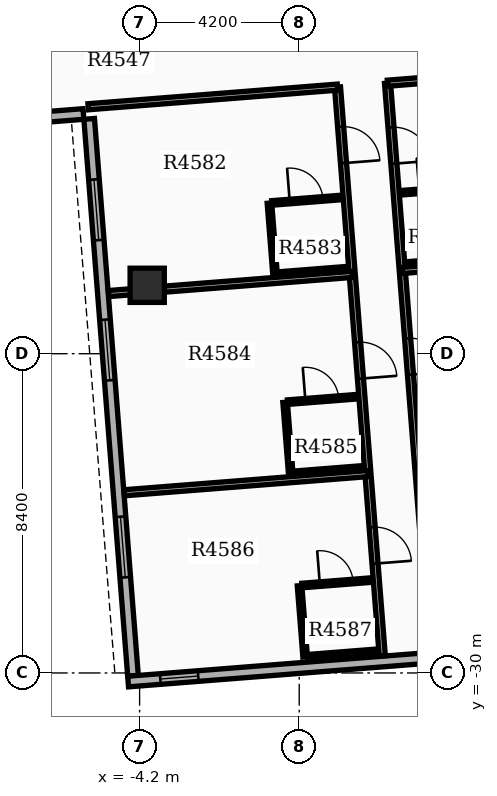
"""IFC4 building model, lengths in metres.
Left out: names, types, materials, properties, quantities, classifications, styles, units other than length and angle.
Written with IfcOpenShell. Run it as: python <this file> out.ifc"""

import sys

from ifc_helpers import new_model, si_unit, direction, frame, frame_2d, origin, origin_2d, place, context, subcontext, project, spatial, rectangle, circle, extrude, element, fill, save


model = new_model("IFC4")
c1 = context("Model", 3, precision=1e-05, world=origin(), true_north=direction((0.0, 1.0)))
c2 = subcontext(c1, "Body", "Model", "MODEL_VIEW")
j1 = project(units=[si_unit("LENGTHUNIT", "METRE"), si_unit("PLANEANGLEUNIT", "RADIAN")], contexts=[c1])
p1 = place(None, origin())
s1 = spatial("IfcSite", under=j1, at=p1, CompositionType="ELEMENT")
p2 = place(p1, origin())
s2 = spatial("IfcBuilding", under=s1, at=p2, CompositionType="ELEMENT")
p3 = place(p2, frame((0.0, 0.0, 285.0)))
s3 = spatial("IfcBuildingStorey", under=s2, at=p3, CompositionType="ELEMENT", Elevation=285.0)
p4 = place(p3, frame((-4.0, -19.8, 0.0), z_axis=(0.0, 0.0, 1.0), x_axis=(1.0, 0.0, 0.0)))
e1 = element("IfcColumn", 1, at=p4, inside=s3, PredefinedType="COLUMN", context=c2, shape_type="SweptSolid", body=[
    extrude(circle(Radius=0.45, at=origin_2d()), origin(), (0.0, 0.0, 1.0), 3.9),
])
p5 = place(p3, frame((-5.527, -15.421, 0.0), z_axis=(0.0, 0.0, 1.0), x_axis=(0.078456642068, -0.996917526837, 0.0)))
e2 = element("IfcWall", 2, at=p5, inside=s3, PredefinedType="STANDARD", context=c2, shape_type="SweptSolid", body=[
    extrude(rectangle(XDim=14.7, YDim=0.28, at=frame_2d((7.35, 0.0))), origin(), (0.0, 0.0, 1.0), 3.13),
])
p6 = place(p5, frame((1.6, 0.0, 0.8)))
e3 = element("IfcOpeningElement", 3, at=p6, cuts=e2, PredefinedType="OPENING", context=c2, shape_type="SweptSolid", body=[
    extrude(rectangle(XDim=1.6, YDim=1.7, at=frame_2d((0.8, 0.85))), frame((0.0, 0.15, 0.0), z_axis=(0.0, -1.0, 0.0), x_axis=(1.0, 0.0, 0.0)), (0.0, 0.0, 1.0), 0.3),
])
p7 = place(p5, frame((5.3, 0.0, 0.8)))
e4 = element("IfcOpeningElement", 4, at=p7, cuts=e2, PredefinedType="OPENING", context=c2, shape_type="SweptSolid", body=[
    extrude(rectangle(XDim=1.6, YDim=1.7, at=frame_2d((0.8, 0.85))), frame((0.0, 0.15, 0.0), z_axis=(0.0, -1.0, 0.0), x_axis=(1.0, 0.0, 0.0)), (0.0, 0.0, 1.0), 0.3),
])
p8 = place(p5, frame((10.5, 0.0, 0.8)))
e5 = element("IfcOpeningElement", 5, at=p8, cuts=e2, PredefinedType="OPENING", context=c2, shape_type="SweptSolid", body=[
    extrude(rectangle(XDim=1.6, YDim=1.7, at=frame_2d((0.8, 0.85))), frame((0.0, 0.15, 0.0), z_axis=(0.0, -1.0, 0.0), x_axis=(1.0, 0.0, 0.0)), (0.0, 0.0, 1.0), 0.3),
])
p9 = place(p3, frame((-4.502, -30.226, 0.0), z_axis=(0.0, 0.0, 1.0), x_axis=(0.996917480881, 0.078457226018, 0.0)))
e6 = element("IfcWall", 6, at=p9, inside=s3, PredefinedType="STANDARD", context=c2, shape_type="SweptSolid", body=[
    extrude(rectangle(XDim=13.72, YDim=0.28, at=frame_2d((6.86, 0.0))), origin(), (0.0, 0.0, 1.0), 3.13),
])
p10 = place(p9, frame((0.85, 0.0, 0.85)))
e7 = element("IfcOpeningElement", 7, at=p10, cuts=e6, PredefinedType="OPENING", context=c2, shape_type="SweptSolid", body=[
    extrude(rectangle(XDim=1.0, YDim=1.5, at=frame_2d((0.5, 0.75))), frame((0.0, 0.15, 0.0), z_axis=(0.0, -1.0, 0.0), x_axis=(1.0, 0.0, 0.0)), (0.0, 0.0, 1.0), 0.3),
])
p11 = place(p3, frame((-11.958, -15.787, 0.0), z_axis=(0.0, 0.0, 1.0), x_axis=(0.996916125428, 0.078474447191, 0.0)))
e8 = element("IfcWall", 8, at=p11, inside=s3, PredefinedType="STANDARD", context=c2, shape_type="SweptSolid", body=[
    extrude(rectangle(XDim=6.3, YDim=0.28, at=frame_2d((3.15, 0.0))), origin(), (0.0, 0.0, 1.0), 3.13),
])
p12 = place(p3, frame((2.323, -14.482, 0.0), z_axis=(0.0, 0.0, 1.0), x_axis=(0.078453666116, -0.996917761038, 0.0)))
e9 = element("IfcWall", 9, at=p12, inside=s3, PredefinedType="PARTITIONING", context=c2, shape_type="SweptSolid", body=[
    extrude(rectangle(XDim=15.012, YDim=0.16, at=frame_2d((7.506, 0.0))), origin(), (0.0, 0.0, 1.0), 3.12),
])
p13 = place(p12, frame((1.165, 0.0, 0.0)))
e10 = element("IfcOpeningElement", 10, at=p13, cuts=e9, PredefinedType="OPENING", context=c2, shape_type="SweptSolid", body=[
    extrude(rectangle(XDim=0.96, YDim=2.15, at=frame_2d((0.48, 1.075))), frame((0.0, 0.09, 0.0), z_axis=(0.0, -1.0, 0.0), x_axis=(1.0, 0.0, 0.0)), (0.0, 0.0, 1.0), 0.18),
])
p14 = place(p12, frame((6.734, 0.0, 0.0)))
e11 = element("IfcOpeningElement", 11, at=p14, cuts=e9, PredefinedType="OPENING", context=c2, shape_type="SweptSolid", body=[
    extrude(rectangle(XDim=0.96, YDim=2.15, at=frame_2d((0.48, 1.075))), frame((0.0, 0.09, 0.0), z_axis=(0.0, -1.0, 0.0), x_axis=(1.0, 0.0, 0.0)), (0.0, 0.0, 1.0), 0.18),
])
p15 = place(p12, frame((11.616, 0.0, 0.0)))
e12 = element("IfcOpeningElement", 12, at=p15, cuts=e9, PredefinedType="OPENING", context=c2, shape_type="SweptSolid", body=[
    extrude(rectangle(XDim=0.96, YDim=2.15, at=frame_2d((0.48, 1.075))), frame((0.0, 0.09, 0.0), z_axis=(0.0, -1.0, 0.0), x_axis=(1.0, 0.0, 0.0)), (0.0, 0.0, 1.0), 0.18),
])
p16 = place(p3, frame((2.323, -14.482, 0.0), z_axis=(0.0, 0.0, 1.0), x_axis=(0.996915230802, 0.078485811425, 0.0)))
e13 = element("IfcWall", 13, at=p16, inside=s3, PredefinedType="PARTITIONING", context=c2, shape_type="SweptSolid", body=[
    extrude(rectangle(XDim=5.54, YDim=0.16, at=frame_2d((2.77, 0.0))), origin(), (0.0, 0.0, 1.0), 3.12),
])
p17 = place(p3, frame((2.711, -19.409, 0.0), z_axis=(0.0, 0.0, 1.0), x_axis=(0.996916817298, 0.078465657388, 0.0)))
e14 = element("IfcWall", 14, at=p17, inside=s3, PredefinedType="PARTITIONING", context=c2, shape_type="SweptSolid", body=[
    extrude(rectangle(XDim=5.392, YDim=0.16, at=frame_2d((2.696, 0.0))), origin(), (0.0, 0.0, 1.0), 3.12),
])
p18 = place(p3, frame((2.691, -17.365, 0.0), z_axis=(0.0, 0.0, 1.0), x_axis=(0.996916400774, 0.0784709492, 0.0)))
e15 = element("IfcWall", 15, at=p18, inside=s3, PredefinedType="PARTITIONING", context=c2, shape_type="SweptSolid", body=[
    extrude(rectangle(XDim=1.82, YDim=0.12, at=frame_2d((0.91, 0.0))), origin(), (0.0, 0.0, 1.0), 3.12),
])
p19 = place(p18, frame((0.47, 0.0, 0.0)))
e16 = element("IfcOpeningElement", 16, at=p19, cuts=e15, PredefinedType="OPENING", context=c2, shape_type="SweptSolid", body=[
    extrude(rectangle(XDim=0.88, YDim=2.1, at=frame_2d((0.44, 1.05))), frame((0.0, 0.07, 0.0), z_axis=(0.0, -1.0, 0.0), x_axis=(1.0, 0.0, 0.0)), (0.0, 0.0, 1.0), 0.14),
])
p20 = place(p3, frame((2.838, -19.239, 0.0), z_axis=(0.0, 0.0, 1.0), x_axis=(0.996916400774, 0.0784709492, 0.0)))
e17 = element("IfcWall", 17, at=p20, inside=s3, PredefinedType="PARTITIONING", context=c2, shape_type="SweptSolid", body=[
    extrude(rectangle(XDim=1.82, YDim=0.12, at=frame_2d((0.91, 0.0))), origin(), (0.0, 0.0, 1.0), 3.12),
])
p21 = place(p3, frame((3.103, -22.606, 0.0), z_axis=(0.0, 0.0, 1.0), x_axis=(0.996915574626, 0.078481444107, 0.0)))
e18 = element("IfcWall", 18, at=p21, inside=s3, PredefinedType="PARTITIONING", context=c2, shape_type="SweptSolid", body=[
    extrude(rectangle(XDim=1.82, YDim=0.12, at=frame_2d((0.91, 0.0))), origin(), (0.0, 0.0, 1.0), 3.12),
])
p22 = place(p21, frame((0.47, 0.0, 0.0)))
e19 = element("IfcOpeningElement", 19, at=p22, cuts=e18, PredefinedType="OPENING", context=c2, shape_type="SweptSolid", body=[
    extrude(rectangle(XDim=0.88, YDim=2.1, at=frame_2d((0.44, 1.05))), frame((0.0, 0.07, 0.0), z_axis=(0.0, -1.0, 0.0), x_axis=(1.0, 0.0, 0.0)), (0.0, 0.0, 1.0), 0.14),
])
p23 = place(p3, frame((1.008, -14.586, 0.0), z_axis=(0.0, 0.0, 1.0), x_axis=(0.078453666116, -0.996917761038, 0.0)))
e20 = element("IfcWall", 20, at=p23, inside=s3, PredefinedType="PARTITIONING", context=c2, shape_type="SweptSolid", body=[
    extrude(rectangle(XDim=15.012, YDim=0.16, at=frame_2d((7.506, 0.0))), origin(), (0.0, 0.0, 1.0), 3.12),
])
p24 = place(p23, frame((1.046, 0.0, 0.0)))
e21 = element("IfcOpeningElement", 21, at=p24, cuts=e20, PredefinedType="OPENING", context=c2, shape_type="SweptSolid", body=[
    extrude(rectangle(XDim=0.96, YDim=2.15, at=frame_2d((0.48, 1.075))), frame((0.0, 0.09, 0.0), z_axis=(0.0, -1.0, 0.0), x_axis=(1.0, 0.0, 0.0)), (0.0, 0.0, 1.0), 0.18),
])
p25 = place(p23, frame((6.734, 0.0, 0.0)))
e22 = element("IfcOpeningElement", 22, at=p25, cuts=e20, PredefinedType="OPENING", context=c2, shape_type="SweptSolid", body=[
    extrude(rectangle(XDim=0.96, YDim=2.15, at=frame_2d((0.48, 1.075))), frame((0.0, 0.09, 0.0), z_axis=(0.0, -1.0, 0.0), x_axis=(1.0, 0.0, 0.0)), (0.0, 0.0, 1.0), 0.18),
])
p26 = place(p23, frame((11.616, 0.0, 0.0)))
e23 = element("IfcOpeningElement", 23, at=p26, cuts=e20, PredefinedType="OPENING", context=c2, shape_type="SweptSolid", body=[
    extrude(rectangle(XDim=0.96, YDim=2.15, at=frame_2d((0.48, 1.075))), frame((0.0, 0.09, 0.0), z_axis=(0.0, -1.0, 0.0), x_axis=(1.0, 0.0, 0.0)), (0.0, 0.0, 1.0), 0.18),
])
p27 = place(p3, frame((1.008, -14.586, 0.0), z_axis=(0.0, 0.0, 1.0), x_axis=(-0.996916277751, -0.078472512094, 0.0)))
e24 = element("IfcWall", 24, at=p27, inside=s3, PredefinedType="PARTITIONING", context=c2, shape_type="SweptSolid", body=[
    extrude(rectangle(XDim=6.58, YDim=0.16, at=frame_2d((3.29, 0.0))), origin(), (0.0, 0.0, 1.0), 3.12),
])
p28 = place(p3, frame((1.395, -19.513, 0.0), z_axis=(0.0, 0.0, 1.0), x_axis=(-0.996917397945, -0.078458279834, 0.0)))
e25 = element("IfcWall", 25, at=p28, inside=s3, PredefinedType="PARTITIONING", context=c2, shape_type="SweptSolid", body=[
    extrude(rectangle(XDim=6.432, YDim=0.16, at=frame_2d((3.216, 0.0))), origin(), (0.0, 0.0, 1.0), 3.12),
])
p29 = place(p3, frame((-0.719, -17.633, 0.0), z_axis=(0.0, 0.0, 1.0), x_axis=(0.996916400774, 0.0784709492, 0.0)))
e26 = element("IfcWall", 26, at=p29, inside=s3, PredefinedType="PARTITIONING", context=c2, shape_type="SweptSolid", body=[
    extrude(rectangle(XDim=1.82, YDim=0.12, at=frame_2d((0.91, 0.0))), origin(), (0.0, 0.0, 1.0), 3.12),
])
p30 = place(p29, frame((0.47, 0.0, 0.0)))
e27 = element("IfcOpeningElement", 27, at=p30, cuts=e26, PredefinedType="OPENING", context=c2, shape_type="SweptSolid", body=[
    extrude(rectangle(XDim=0.88, YDim=2.1, at=frame_2d((0.44, 1.05))), frame((0.0, 0.07, 0.0), z_axis=(0.0, -1.0, 0.0), x_axis=(1.0, 0.0, 0.0)), (0.0, 0.0, 1.0), 0.14),
])
p31 = place(p3, frame((-0.571, -19.507, 0.0), z_axis=(0.0, 0.0, 1.0), x_axis=(0.996916400774, 0.0784709492, 0.0)))
e28 = element("IfcWall", 28, at=p31, inside=s3, PredefinedType="PARTITIONING", context=c2, shape_type="SweptSolid", body=[
    extrude(rectangle(XDim=1.82, YDim=0.12, at=frame_2d((0.91, 0.0))), origin(), (0.0, 0.0, 1.0), 3.12),
])
p32 = place(p3, frame((-0.784, -17.638, 0.0), z_axis=(0.0, 0.0, 1.0), x_axis=(0.078553074946, -0.996909932951, 0.0)))
e29 = element("IfcWall", 29, at=p32, inside=s3, PredefinedType="PARTITIONING", context=c2, shape_type="SweptSolid", body=[
    extrude(rectangle(XDim=1.88, YDim=0.12, at=frame_2d((0.94, 0.0))), origin(), (0.0, 0.0, 1.0), 3.12),
])
p33 = place(p3, frame((1.808, -24.754, 0.0), z_axis=(0.0, 0.0, 1.0), x_axis=(-0.996917631587, -0.078455311041, 0.0)))
e30 = element("IfcWall", 30, at=p33, inside=s3, PredefinedType="PARTITIONING", context=c2, shape_type="SweptSolid", body=[
    extrude(rectangle(XDim=6.432, YDim=0.16, at=frame_2d((3.216, 0.0))), origin(), (0.0, 0.0, 1.0), 3.12),
])
p34 = place(p3, frame((-0.306, -22.875, 0.0), z_axis=(0.0, 0.0, 1.0), x_axis=(0.996916400774, 0.0784709492, 0.0)))
e31 = element("IfcWall", 31, at=p34, inside=s3, PredefinedType="PARTITIONING", context=c2, shape_type="SweptSolid", body=[
    extrude(rectangle(XDim=1.82, YDim=0.12, at=frame_2d((0.91, 0.0))), origin(), (0.0, 0.0, 1.0), 3.12),
])
p35 = place(p34, frame((0.47, 0.0, 0.0)))
e32 = element("IfcOpeningElement", 32, at=p35, cuts=e31, PredefinedType="OPENING", context=c2, shape_type="SweptSolid", body=[
    extrude(rectangle(XDim=0.88, YDim=2.1, at=frame_2d((0.44, 1.05))), frame((0.0, 0.07, 0.0), z_axis=(0.0, -1.0, 0.0), x_axis=(1.0, 0.0, 0.0)), (0.0, 0.0, 1.0), 0.14),
])
p36 = place(p3, frame((-0.159, -24.749, 0.0), z_axis=(0.0, 0.0, 1.0), x_axis=(0.996916400774, 0.0784709492, 0.0)))
e33 = element("IfcWall", 33, at=p36, inside=s3, PredefinedType="PARTITIONING", context=c2, shape_type="SweptSolid", body=[
    extrude(rectangle(XDim=1.82, YDim=0.12, at=frame_2d((0.91, 0.0))), origin(), (0.0, 0.0, 1.0), 3.12),
])
p37 = place(p3, frame((-0.371, -22.88, 0.0), z_axis=(0.0, 0.0, 1.0), x_axis=(0.078563244057, -0.996909131608, 0.0)))
e34 = element("IfcWall", 34, at=p37, inside=s3, PredefinedType="PARTITIONING", context=c2, shape_type="SweptSolid", body=[
    extrude(rectangle(XDim=1.88, YDim=0.12, at=frame_2d((0.94, 0.0))), origin(), (0.0, 0.0, 1.0), 3.12),
])
p38 = place(p3, frame((0.073, -27.7, 0.0), z_axis=(0.0, 0.0, 1.0), x_axis=(0.996916400774, 0.0784709492, 0.0)))
e35 = element("IfcWall", 35, at=p38, inside=s3, PredefinedType="PARTITIONING", context=c2, shape_type="SweptSolid", body=[
    extrude(rectangle(XDim=1.82, YDim=0.12, at=frame_2d((0.91, 0.0))), origin(), (0.0, 0.0, 1.0), 3.12),
])
p39 = place(p38, frame((0.47, 0.0, 0.0)))
e36 = element("IfcOpeningElement", 36, at=p39, cuts=e35, PredefinedType="OPENING", context=c2, shape_type="SweptSolid", body=[
    extrude(rectangle(XDim=0.88, YDim=2.1, at=frame_2d((0.44, 1.05))), frame((0.0, 0.07, 0.0), z_axis=(0.0, -1.0, 0.0), x_axis=(1.0, 0.0, 0.0)), (0.0, 0.0, 1.0), 0.14),
])
p40 = place(p3, frame((0.221, -29.574, 0.0), z_axis=(0.0, 0.0, 1.0), x_axis=(0.996916400774, 0.0784709492, 0.0)))
e37 = element("IfcWall", 37, at=p40, inside=s3, PredefinedType="PARTITIONING", context=c2, shape_type="SweptSolid", body=[
    extrude(rectangle(XDim=1.82, YDim=0.12, at=frame_2d((0.91, 0.0))), origin(), (0.0, 0.0, 1.0), 3.12),
])
p41 = place(p3, frame((0.009, -27.705, 0.0), z_axis=(0.0, 0.0, 1.0), x_axis=(0.07843418698, -0.996919293781, 0.0)))
e38 = element("IfcWall", 38, at=p41, inside=s3, PredefinedType="PARTITIONING", context=c2, shape_type="SweptSolid", body=[
    extrude(rectangle(XDim=1.88, YDim=0.12, at=frame_2d((0.94, 0.0))), origin(), (0.0, 0.0, 1.0), 3.12),
])
p42 = place(p6, origin())
e39 = element("IfcWindow", 39, at=p42, inside=s3, PartitioningType="SINGLE_PANEL", PredefinedType="WINDOW", context=c2, shape_type="SweptSolid", body=[
    extrude(rectangle(XDim=1.6, YDim=1.7, at=frame_2d((0.8, 0.85))), frame((0.0, 0.03, 0.0), z_axis=(0.0, -1.0, 0.0), x_axis=(1.0, 0.0, 0.0)), (0.0, 0.0, 1.0), 0.06),
])
fill(e3, e39)
p43 = place(p7, origin())
e40 = element("IfcWindow", 40, at=p43, inside=s3, PartitioningType="SINGLE_PANEL", PredefinedType="WINDOW", context=c2, shape_type="SweptSolid", body=[
    extrude(rectangle(XDim=1.6, YDim=1.7, at=frame_2d((0.8, 0.85))), frame((0.0, 0.03, 0.0), z_axis=(0.0, -1.0, 0.0), x_axis=(1.0, 0.0, 0.0)), (0.0, 0.0, 1.0), 0.06),
])
fill(e4, e40)
p44 = place(p8, origin())
e41 = element("IfcWindow", 41, at=p44, inside=s3, PartitioningType="SINGLE_PANEL", PredefinedType="WINDOW", context=c2, shape_type="SweptSolid", body=[
    extrude(rectangle(XDim=1.6, YDim=1.7, at=frame_2d((0.8, 0.85))), frame((0.0, 0.03, 0.0), z_axis=(0.0, -1.0, 0.0), x_axis=(1.0, 0.0, 0.0)), (0.0, 0.0, 1.0), 0.06),
])
fill(e5, e41)
p45 = place(p10, origin())
e42 = element("IfcWindow", 42, at=p45, inside=s3, PartitioningType="SINGLE_PANEL", PredefinedType="WINDOW", context=c2, shape_type="SweptSolid", body=[
    extrude(rectangle(XDim=1.0, YDim=1.5, at=frame_2d((0.5, 0.75))), frame((0.0, 0.03, 0.0), z_axis=(0.0, -1.0, 0.0), x_axis=(1.0, 0.0, 0.0)), (0.0, 0.0, 1.0), 0.06),
])
fill(e7, e42)
p46 = place(p13, origin())
e43 = element("IfcDoor", 43, at=p46, inside=s3, OperationType="SINGLE_SWING_RIGHT", PredefinedType="DOOR", context=c2, shape_type="SweptSolid", body=[
    extrude(rectangle(XDim=0.96, YDim=2.15, at=frame_2d((0.48, 1.075))), frame((0.0, 0.025, 0.0), z_axis=(0.0, -1.0, 0.0), x_axis=(1.0, 0.0, 0.0)), (0.0, 0.0, 1.0), 0.05),
])
fill(e10, e43)
p47 = place(p14, origin())
e44 = element("IfcDoor", 44, at=p47, inside=s3, OperationType="SINGLE_SWING_RIGHT", PredefinedType="DOOR", context=c2, shape_type="SweptSolid", body=[
    extrude(rectangle(XDim=0.96, YDim=2.15, at=frame_2d((0.48, 1.075))), frame((0.0, 0.025, 0.0), z_axis=(0.0, -1.0, 0.0), x_axis=(1.0, 0.0, 0.0)), (0.0, 0.0, 1.0), 0.05),
])
fill(e11, e44)
p48 = place(p24, origin())
e45 = element("IfcDoor", 45, at=p48, inside=s3, OperationType="SINGLE_SWING_RIGHT", PredefinedType="DOOR", context=c2, shape_type="SweptSolid", body=[
    extrude(rectangle(XDim=0.96, YDim=2.15, at=frame_2d((0.48, 1.075))), frame((0.0, 0.025, 0.0), z_axis=(0.0, -1.0, 0.0), x_axis=(1.0, 0.0, 0.0)), (0.0, 0.0, 1.0), 0.05),
])
fill(e21, e45)
p49 = place(p30, origin())
e46 = element("IfcDoor", 46, at=p49, inside=s3, OperationType="SINGLE_SWING_LEFT", PredefinedType="DOOR", context=c2, shape_type="SweptSolid", body=[
    extrude(rectangle(XDim=0.88, YDim=2.1, at=frame_2d((0.44, 1.05))), frame((0.0, 0.025, 0.0), z_axis=(0.0, -1.0, 0.0), x_axis=(1.0, 0.0, 0.0)), (0.0, 0.0, 1.0), 0.05),
])
fill(e27, e46)
p50 = place(p25, origin())
e47 = element("IfcDoor", 47, at=p50, inside=s3, OperationType="SINGLE_SWING_RIGHT", PredefinedType="DOOR", context=c2, shape_type="SweptSolid", body=[
    extrude(rectangle(XDim=0.96, YDim=2.15, at=frame_2d((0.48, 1.075))), frame((0.0, 0.025, 0.0), z_axis=(0.0, -1.0, 0.0), x_axis=(1.0, 0.0, 0.0)), (0.0, 0.0, 1.0), 0.05),
])
fill(e22, e47)
p51 = place(p35, origin())
e48 = element("IfcDoor", 48, at=p51, inside=s3, OperationType="SINGLE_SWING_LEFT", PredefinedType="DOOR", context=c2, shape_type="SweptSolid", body=[
    extrude(rectangle(XDim=0.88, YDim=2.1, at=frame_2d((0.44, 1.05))), frame((0.0, 0.025, 0.0), z_axis=(0.0, -1.0, 0.0), x_axis=(1.0, 0.0, 0.0)), (0.0, 0.0, 1.0), 0.05),
])
fill(e32, e48)
p52 = place(p26, origin())
e49 = element("IfcDoor", 49, at=p52, inside=s3, OperationType="SINGLE_SWING_RIGHT", PredefinedType="DOOR", context=c2, shape_type="SweptSolid", body=[
    extrude(rectangle(XDim=0.96, YDim=2.15, at=frame_2d((0.48, 1.075))), frame((0.0, 0.025, 0.0), z_axis=(0.0, -1.0, 0.0), x_axis=(1.0, 0.0, 0.0)), (0.0, 0.0, 1.0), 0.05),
])
fill(e23, e49)
p53 = place(p39, origin())
e50 = element("IfcDoor", 50, at=p53, inside=s3, OperationType="SINGLE_SWING_LEFT", PredefinedType="DOOR", context=c2, shape_type="SweptSolid", body=[
    extrude(rectangle(XDim=0.88, YDim=2.1, at=frame_2d((0.44, 1.05))), frame((0.0, 0.025, 0.0), z_axis=(0.0, -1.0, 0.0), x_axis=(1.0, 0.0, 0.0)), (0.0, 0.0, 1.0), 0.05),
])
fill(e36, e50)
save(model, sys.argv[1])
